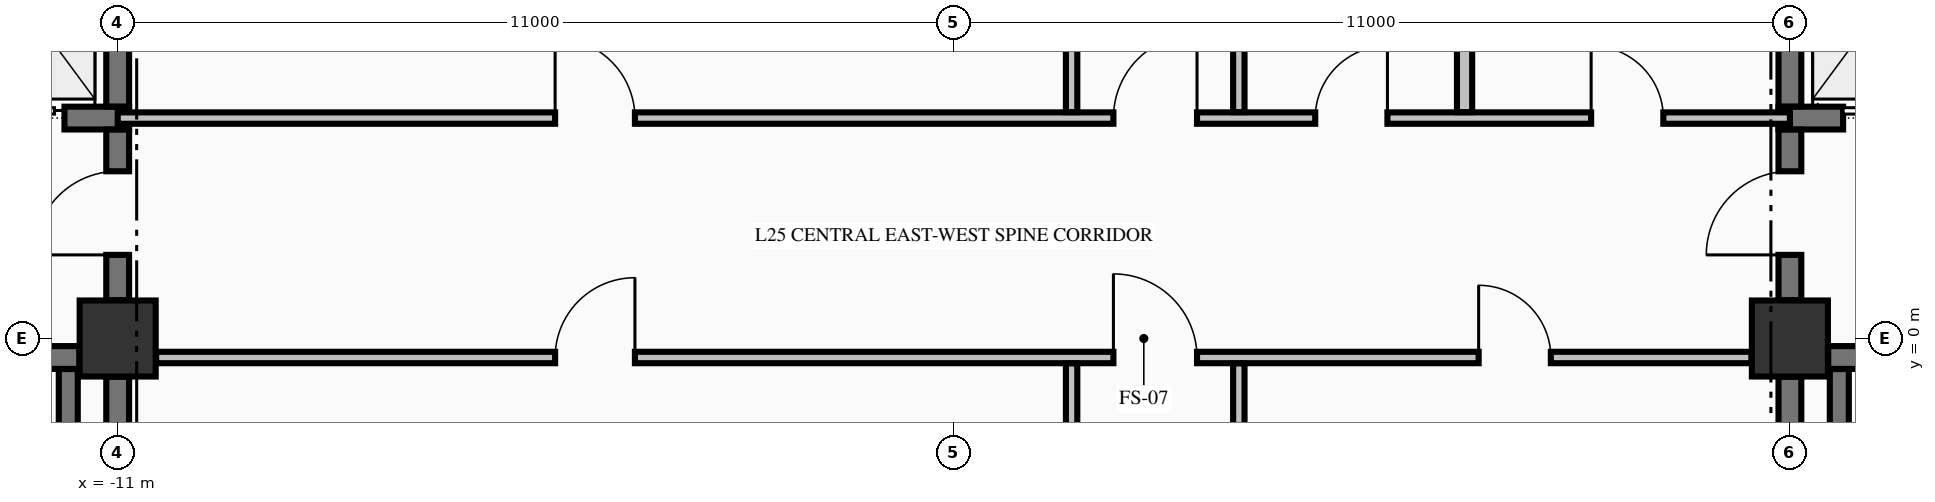
"""IFC4 building model, lengths in metres.
Left out: names, types, materials, properties, quantities, classifications, styles, units other than length and angle.
Written with IfcOpenShell. Run it as: python <this file> out.ifc"""

import sys

from ifc_helpers import new_model, si_unit, direction, frame, frame_2d, origin, origin_2d, place, context, subcontext, project, spatial, rectangle, extrude, element, fill, save


model = new_model("IFC4")
c1 = context("Model", 3, precision=1e-05, world=origin(), true_north=direction((0.0, 1.0)))
c2 = subcontext(c1, "Body", "Model", "MODEL_VIEW")
j1 = project(units=[si_unit("LENGTHUNIT", "METRE"), si_unit("PLANEANGLEUNIT", "RADIAN")], contexts=[c1])
p1 = place(None, origin())
s1 = spatial("IfcSite", under=j1, at=p1, CompositionType="ELEMENT")
p2 = place(p1, origin())
s2 = spatial("IfcBuilding", under=s1, at=p2, CompositionType="ELEMENT")
p3 = place(p2, frame((0.0, 0.0, 102.07)))
s3 = spatial("IfcBuildingStorey", under=s2, at=p3, CompositionType="ELEMENT", Elevation=102.07)
for number, where, z_axis, x_axis in (
    (1, (-11.0, 0.0, -0.25), (0.0, 0.0, 1.0), (1.0, 0.0, 0.0)),
    (2, (11.0, 0.0, -0.25), (0.0, 0.0, 1.0), (1.0, 0.0, 0.0)),
):
    element("IfcColumn", number, at=place(p3, frame(where, z_axis=z_axis, x_axis=x_axis)), inside=s3, PredefinedType="COLUMN", context=c2, shape_type="SweptSolid", body=[
        extrude(rectangle(XDim=1.0, YDim=1.0, at=origin_2d()), origin(), (0.0, 0.0, 1.0), 3.57),
    ])
p4 = place(p3, frame((-19.496, -0.25, 0.0), z_axis=(0.0, 0.0, 1.0), x_axis=(1.0, 0.0, 0.0)))
e3 = element("IfcWall", 3, at=p4, inside=s3, PredefinedType="SHEAR", context=c2, shape_type="SweptSolid", body=[
    extrude(rectangle(XDim=7.992, YDim=0.3, at=frame_2d((3.996, 0.0))), origin(), (0.0, 0.0, 1.0), 3.32),
])
p5 = place(p4, frame((5.796, 0.0, 0.0)))
e4 = element("IfcOpeningElement", 4, at=p5, cuts=e3, PredefinedType="OPENING", context=c2, shape_type="SweptSolid", body=[
    extrude(rectangle(XDim=1.1, YDim=2.15, at=frame_2d((0.55, 1.075))), frame((0.0, 0.16, 0.0), z_axis=(0.0, -1.0, 0.0), x_axis=(1.0, 0.0, 0.0)), (0.0, 0.0, 1.0), 0.32),
])
p6 = place(p3, frame((11.504, -0.25, 0.0), z_axis=(0.0, 0.0, 1.0), x_axis=(1.0, 0.0, 0.0)))
e5 = element("IfcWall", 5, at=p6, inside=s3, PredefinedType="SHEAR", context=c2, shape_type="SweptSolid", body=[
    extrude(rectangle(XDim=3.371, YDim=0.3, at=frame_2d((1.686, 0.0))), origin(), (0.0, 0.0, 1.0), 3.32),
])
p7 = place(p6, frame((1.096, 0.0, 0.0)))
e6 = element("IfcOpeningElement", 6, at=p7, cuts=e5, PredefinedType="OPENING", context=c2, shape_type="SweptSolid", body=[
    extrude(rectangle(XDim=1.1, YDim=2.15, at=frame_2d((0.55, 1.075))), frame((0.0, 0.16, 0.0), z_axis=(0.0, -1.0, 0.0), x_axis=(1.0, 0.0, 0.0)), (0.0, 0.0, 1.0), 0.32),
])
p8 = place(p3, frame((-14.875, 2.9, 0.0), z_axis=(0.0, 0.0, 1.0), x_axis=(1.0, 0.0, 0.0)))
e7 = element("IfcWall", 7, at=p8, inside=s3, PredefinedType="SHEAR", context=c2, shape_type="SweptSolid", body=[
    extrude(rectangle(XDim=4.025, YDim=0.3, at=frame_2d((2.012, 0.0))), origin(), (0.0, 0.0, 1.0), 3.32),
])
p9 = place(p8, frame((2.075, 0.0, 0.0)))
e8 = element("IfcOpeningElement", 8, at=p9, cuts=e7, PredefinedType="OPENING", context=c2, shape_type="SweptSolid", body=[
    extrude(rectangle(XDim=1.1, YDim=2.2, at=frame_2d((0.55, 1.1))), frame((0.0, 0.16, 0.0), z_axis=(0.0, -1.0, 0.0), x_axis=(1.0, 0.0, 0.0)), (0.0, 0.0, 1.0), 0.32),
])
p10 = place(p3, frame((10.85, 2.9, 0.0), z_axis=(0.0, 0.0, 1.0), x_axis=(1.0, 0.0, 0.0)))
e9 = element("IfcWall", 9, at=p10, inside=s3, PredefinedType="SHEAR", context=c2, shape_type="SweptSolid", body=[
    extrude(rectangle(XDim=4.025, YDim=0.3, at=frame_2d((2.012, 0.0))), origin(), (0.0, 0.0, 1.0), 3.32),
])
p11 = place(p10, frame((0.85, 0.0, 0.0)))
e10 = element("IfcOpeningElement", 10, at=p11, cuts=e9, PredefinedType="OPENING", context=c2, shape_type="SweptSolid", body=[
    extrude(rectangle(XDim=1.1, YDim=2.2, at=frame_2d((0.55, 1.1))), frame((0.0, 0.16, 0.0), z_axis=(0.0, -1.0, 0.0), x_axis=(1.0, 0.0, 0.0)), (0.0, 0.0, 1.0), 0.32),
])
p12 = place(p3, frame((-10.494, -0.25, 0.0), z_axis=(0.0, 0.0, 1.0), x_axis=(1.0, 0.0, 0.0)))
e11 = element("IfcWall", 11, at=p12, inside=s3, PredefinedType="PARTITIONING", context=c2, shape_type="SweptSolid", body=[
    extrude(rectangle(XDim=20.988, YDim=0.15, at=frame_2d((10.494, 0.0))), origin(), (0.0, 0.0, 1.0), 3.32),
])
p13 = place(p12, frame((12.594, 0.0, 0.0)))
e12 = element("IfcOpeningElement", 12, at=p13, cuts=e11, PredefinedType="OPENING", context=c2, shape_type="SweptSolid", body=[
    extrude(rectangle(XDim=1.1, YDim=2.15, at=frame_2d((0.55, 1.075))), frame((0.0, 0.085, 0.0), z_axis=(0.0, -1.0, 0.0), x_axis=(1.0, 0.0, 0.0)), (0.0, 0.0, 1.0), 0.17),
])
p14 = place(p12, frame((5.249, 0.0, 0.0)))
e13 = element("IfcOpeningElement", 13, at=p14, cuts=e11, PredefinedType="OPENING", context=c2, shape_type="SweptSolid", body=[
    extrude(rectangle(XDim=1.05, YDim=2.15, at=frame_2d((0.525, 1.075))), frame((0.0, 0.085, 0.0), z_axis=(0.0, -1.0, 0.0), x_axis=(1.0, 0.0, 0.0)), (0.0, 0.0, 1.0), 0.17),
])
p15 = place(p12, frame((17.399, 0.0, 0.0)))
e14 = element("IfcOpeningElement", 14, at=p15, cuts=e11, PredefinedType="OPENING", context=c2, shape_type="SweptSolid", body=[
    extrude(rectangle(XDim=0.95, YDim=2.15, at=frame_2d((0.475, 1.075))), frame((0.0, 0.085, 0.0), z_axis=(0.0, -1.0, 0.0), x_axis=(1.0, 0.0, 0.0)), (0.0, 0.0, 1.0), 0.17),
])
p16 = place(p3, frame((-11.0, 2.9, 0.0), z_axis=(0.0, 0.0, 1.0), x_axis=(1.0, 0.0, 0.0)))
e15 = element("IfcWall", 15, at=p16, inside=s3, PredefinedType="PARTITIONING", context=c2, shape_type="SweptSolid", body=[
    extrude(rectangle(XDim=22.0, YDim=0.15, at=frame_2d((11.0, 0.0))), origin(), (0.0, 0.0, 1.0), 3.32),
])
p17 = place(p16, frame((13.1, 0.0, 0.0)))
e16 = element("IfcOpeningElement", 16, at=p17, cuts=e15, PredefinedType="OPENING", context=c2, shape_type="SweptSolid", body=[
    extrude(rectangle(XDim=1.1, YDim=2.15, at=frame_2d((0.55, 1.075))), frame((0.0, 0.085, 0.0), z_axis=(0.0, -1.0, 0.0), x_axis=(1.0, 0.0, 0.0)), (0.0, 0.0, 1.0), 0.17),
])
p18 = place(p16, frame((5.755, 0.0, 0.0)))
e17 = element("IfcOpeningElement", 17, at=p18, cuts=e15, PredefinedType="OPENING", context=c2, shape_type="SweptSolid", body=[
    extrude(rectangle(XDim=1.05, YDim=2.15, at=frame_2d((0.525, 1.075))), frame((0.0, 0.085, 0.0), z_axis=(0.0, -1.0, 0.0), x_axis=(1.0, 0.0, 0.0)), (0.0, 0.0, 1.0), 0.17),
])
p19 = place(p16, frame((15.755, 0.0, 0.0)))
e18 = element("IfcOpeningElement", 18, at=p19, cuts=e15, PredefinedType="OPENING", context=c2, shape_type="SweptSolid", body=[
    extrude(rectangle(XDim=0.95, YDim=2.15, at=frame_2d((0.475, 1.075))), frame((0.0, 0.085, 0.0), z_axis=(0.0, -1.0, 0.0), x_axis=(1.0, 0.0, 0.0)), (0.0, 0.0, 1.0), 0.17),
])
p20 = place(p16, frame((19.385, 0.0, 0.0)))
e19 = element("IfcOpeningElement", 19, at=p20, cuts=e15, PredefinedType="OPENING", context=c2, shape_type="SweptSolid", body=[
    extrude(rectangle(XDim=0.95, YDim=2.15, at=frame_2d((0.475, 1.075))), frame((0.0, 0.085, 0.0), z_axis=(0.0, -1.0, 0.0), x_axis=(1.0, 0.0, 0.0)), (0.0, 0.0, 1.0), 0.17),
])
p21 = place(p3, frame((-11.65, -9.798, 0.0), z_axis=(0.0, 0.0, 1.0), x_axis=(0.0, 1.0, 0.0)))
e20 = element("IfcWall", 20, at=p21, inside=s3, PredefinedType="SOLIDWALL", context=c2, shape_type="SweptSolid", body=[
    extrude(rectangle(XDim=9.396, YDim=0.25, at=frame_2d((4.698, 0.0))), origin(), (0.0, 0.0, 1.0), 3.32),
])
p22 = place(p3, frame((-11.0, -9.446, 0.0), z_axis=(0.0, 0.0, 1.0), x_axis=(0.0, 1.0, 0.0)))
e21 = element("IfcWall", 21, at=p22, inside=s3, PredefinedType="SHEAR", context=c2, shape_type="SweptSolid", body=[
    extrude(rectangle(XDim=8.942, YDim=0.3, at=frame_2d((4.471, 0.0))), origin(), (0.0, 0.0, 1.0), 3.32),
])
p23 = place(p3, frame((-11.0, 0.504, 0.0), z_axis=(0.0, 0.0, 1.0), x_axis=(0.0, 1.0, 0.0)))
e22 = element("IfcWall", 22, at=p23, inside=s3, PredefinedType="SHEAR", context=c2, shape_type="SweptSolid", body=[
    extrude(rectangle(XDim=2.244, YDim=0.3, at=frame_2d((1.122, 0.0))), origin(), (0.0, 0.0, 1.0), 3.32),
])
p24 = place(p23, frame((0.596, 0.0, 0.0)))
e23 = element("IfcOpeningElement", 23, at=p24, cuts=e22, PredefinedType="OPENING", context=c2, shape_type="SweptSolid", body=[
    extrude(rectangle(XDim=1.1, YDim=2.15, at=frame_2d((0.55, 1.075))), frame((0.0, 0.16, 0.0), z_axis=(0.0, -1.0, 0.0), x_axis=(1.0, 0.0, 0.0)), (0.0, 0.0, 1.0), 0.32),
])
p25 = place(p3, frame((-11.0, 3.052, 0.0), z_axis=(0.0, 0.0, 1.0), x_axis=(0.0, 1.0, 0.0)))
e24 = element("IfcWall", 24, at=p25, inside=s3, PredefinedType="SHEAR", context=c2, shape_type="SweptSolid", body=[
    extrude(rectangle(XDim=2.496, YDim=0.3, at=frame_2d((1.248, 0.0))), origin(), (0.0, 0.0, 1.0), 3.32),
])
p26 = place(p3, frame((11.0, -9.446, 0.0), z_axis=(0.0, 0.0, 1.0), x_axis=(0.0, 1.0, 0.0)))
e25 = element("IfcWall", 25, at=p26, inside=s3, PredefinedType="SHEAR", context=c2, shape_type="SweptSolid", body=[
    extrude(rectangle(XDim=8.942, YDim=0.3, at=frame_2d((4.471, 0.0))), origin(), (0.0, 0.0, 1.0), 3.32),
])
p27 = place(p3, frame((11.0, 0.504, 0.0), z_axis=(0.0, 0.0, 1.0), x_axis=(0.0, 1.0, 0.0)))
e26 = element("IfcWall", 26, at=p27, inside=s3, PredefinedType="SHEAR", context=c2, shape_type="SweptSolid", body=[
    extrude(rectangle(XDim=2.244, YDim=0.3, at=frame_2d((1.122, 0.0))), origin(), (0.0, 0.0, 1.0), 3.32),
])
p28 = place(p27, frame((0.596, 0.0, 0.0)))
e27 = element("IfcOpeningElement", 27, at=p28, cuts=e26, PredefinedType="OPENING", context=c2, shape_type="SweptSolid", body=[
    extrude(rectangle(XDim=1.1, YDim=2.15, at=frame_2d((0.55, 1.075))), frame((0.0, 0.16, 0.0), z_axis=(0.0, -1.0, 0.0), x_axis=(1.0, 0.0, 0.0)), (0.0, 0.0, 1.0), 0.32),
])
p29 = place(p3, frame((11.0, 3.052, 0.0), z_axis=(0.0, 0.0, 1.0), x_axis=(0.0, 1.0, 0.0)))
e28 = element("IfcWall", 28, at=p29, inside=s3, PredefinedType="SHEAR", context=c2, shape_type="SweptSolid", body=[
    extrude(rectangle(XDim=2.496, YDim=0.3, at=frame_2d((1.248, 0.0))), origin(), (0.0, 0.0, 1.0), 3.32),
])
p30 = place(p3, frame((11.65, -9.798, 0.0), z_axis=(0.0, 0.0, 1.0), x_axis=(0.0, 1.0, 0.0)))
e29 = element("IfcWall", 29, at=p30, inside=s3, PredefinedType="SOLIDWALL", context=c2, shape_type="SweptSolid", body=[
    extrude(rectangle(XDim=9.396, YDim=0.25, at=frame_2d((4.698, 0.0))), origin(), (0.0, 0.0, 1.0), 3.32),
])
p31 = place(p3, frame((1.55, -9.872, 0.0), z_axis=(0.0, 0.0, 1.0), x_axis=(0.0, 1.0, 0.0)))
e30 = element("IfcWall", 30, at=p31, inside=s3, PredefinedType="PARTITIONING", context=c2, shape_type="SweptSolid", body=[
    extrude(rectangle(XDim=9.544, YDim=0.15, at=frame_2d((4.772, 0.0))), origin(), (0.0, 0.0, 1.0), 3.32),
])
p32 = place(p3, frame((1.55, 2.978, 0.0), z_axis=(0.0, 0.0, 1.0), x_axis=(0.0, 1.0, 0.0)))
e31 = element("IfcWall", 31, at=p32, inside=s3, PredefinedType="PARTITIONING", context=c2, shape_type="SweptSolid", body=[
    extrude(rectangle(XDim=7.444, YDim=0.15, at=frame_2d((3.722, 0.0))), origin(), (0.0, 0.0, 1.0), 3.32),
])
p33 = place(p3, frame((3.75, -4.147, 0.0), z_axis=(0.0, 0.0, 1.0), x_axis=(0.0, 1.0, 0.0)))
e32 = element("IfcWall", 32, at=p33, inside=s3, PredefinedType="PARTITIONING", context=c2, shape_type="SweptSolid", body=[
    extrude(rectangle(XDim=3.819, YDim=0.15, at=frame_2d((1.91, 0.0))), origin(), (0.0, 0.0, 1.0), 3.32),
])
p34 = place(p3, frame((3.75, 2.978, 0.0), z_axis=(0.0, 0.0, 1.0), x_axis=(0.0, 1.0, 0.0)))
e33 = element("IfcWall", 33, at=p34, inside=s3, PredefinedType="PARTITIONING", context=c2, shape_type="SweptSolid", body=[
    extrude(rectangle(XDim=7.444, YDim=0.15, at=frame_2d((3.722, 0.0))), origin(), (0.0, 0.0, 1.0), 3.32),
])
p35 = place(p3, frame((6.72, 2.978, 0.0), z_axis=(0.0, 0.0, 1.0), x_axis=(0.0, 1.0, 0.0)))
e34 = element("IfcWall", 34, at=p35, inside=s3, PredefinedType="PARTITIONING", context=c2, shape_type="SweptSolid", body=[
    extrude(rectangle(XDim=7.444, YDim=0.2, at=frame_2d((3.722, 0.0))), origin(), (0.0, 0.0, 1.0), 3.32),
])
p36 = place(p24, origin())
e35 = element("IfcDoor", 35, at=p36, inside=s3, OperationType="SINGLE_SWING_LEFT", PredefinedType="DOOR", context=c2, shape_type="SweptSolid", body=[
    extrude(rectangle(XDim=1.1, YDim=2.15, at=frame_2d((0.55, 1.075))), frame((0.0, 0.025, 0.0), z_axis=(0.0, -1.0, 0.0), x_axis=(1.0, 0.0, 0.0)), (0.0, 0.0, 1.0), 0.05),
])
fill(e23, e35)
p37 = place(p9, origin())
e36 = element("IfcDoor", 36, at=p37, inside=s3, OperationType="SLIDING_TO_LEFT", PredefinedType="DOOR", context=c2, shape_type="SweptSolid", body=[
    extrude(rectangle(XDim=1.1, YDim=2.2, at=frame_2d((0.55, 1.1))), frame((0.0, 0.025, 0.0), z_axis=(0.0, -1.0, 0.0), x_axis=(1.0, 0.0, 0.0)), (0.0, 0.0, 1.0), 0.05),
])
fill(e8, e36)
p38 = place(p28, origin())
e37 = element("IfcDoor", 37, at=p38, inside=s3, OperationType="SINGLE_SWING_LEFT", PredefinedType="DOOR", context=c2, shape_type="SweptSolid", body=[
    extrude(rectangle(XDim=1.1, YDim=2.15, at=frame_2d((0.55, 1.075))), frame((0.0, 0.025, 0.0), z_axis=(0.0, -1.0, 0.0), x_axis=(1.0, 0.0, 0.0)), (0.0, 0.0, 1.0), 0.05),
])
fill(e27, e37)
p39 = place(p11, origin())
e38 = element("IfcDoor", 38, at=p39, inside=s3, OperationType="SLIDING_TO_RIGHT", PredefinedType="DOOR", context=c2, shape_type="SweptSolid", body=[
    extrude(rectangle(XDim=1.1, YDim=2.2, at=frame_2d((0.55, 1.1))), frame((0.0, 0.025, 0.0), z_axis=(0.0, -1.0, 0.0), x_axis=(1.0, 0.0, 0.0)), (0.0, 0.0, 1.0), 0.05),
])
fill(e10, e38)
p40 = place(p17, origin())
e39 = element("IfcDoor", 39, at=p40, inside=s3, OperationType="SINGLE_SWING_RIGHT", PredefinedType="DOOR", context=c2, shape_type="SweptSolid", body=[
    extrude(rectangle(XDim=1.1, YDim=2.15, at=frame_2d((0.55, 1.075))), frame((0.0, 0.025, 0.0), z_axis=(0.0, -1.0, 0.0), x_axis=(1.0, 0.0, 0.0)), (0.0, 0.0, 1.0), 0.05),
])
fill(e16, e39)
p41 = place(p13, origin())
e40 = element("IfcDoor", 40, at=p41, inside=s3, OperationType="SINGLE_SWING_LEFT", PredefinedType="DOOR", context=c2, shape_type="SweptSolid", body=[
    extrude(rectangle(XDim=1.1, YDim=2.15, at=frame_2d((0.55, 1.075))), frame((0.0, 0.025, 0.0), z_axis=(0.0, -1.0, 0.0), x_axis=(1.0, 0.0, 0.0)), (0.0, 0.0, 1.0), 0.05),
])
fill(e12, e40)
p42 = place(p18, origin())
e41 = element("IfcDoor", 41, at=p42, inside=s3, OperationType="SINGLE_SWING_LEFT", PredefinedType="DOOR", context=c2, shape_type="SweptSolid", body=[
    extrude(rectangle(XDim=1.05, YDim=2.15, at=frame_2d((0.525, 1.075))), frame((0.0, 0.025, 0.0), z_axis=(0.0, -1.0, 0.0), x_axis=(1.0, 0.0, 0.0)), (0.0, 0.0, 1.0), 0.05),
])
fill(e17, e41)
p43 = place(p19, origin())
e42 = element("IfcDoor", 42, at=p43, inside=s3, OperationType="SINGLE_SWING_RIGHT", PredefinedType="DOOR", context=c2, shape_type="SweptSolid", body=[
    extrude(rectangle(XDim=0.95, YDim=2.15, at=frame_2d((0.475, 1.075))), frame((0.0, 0.025, 0.0), z_axis=(0.0, -1.0, 0.0), x_axis=(1.0, 0.0, 0.0)), (0.0, 0.0, 1.0), 0.05),
])
fill(e18, e42)
p44 = place(p20, origin())
e43 = element("IfcDoor", 43, at=p44, inside=s3, OperationType="SINGLE_SWING_LEFT", PredefinedType="DOOR", context=c2, shape_type="SweptSolid", body=[
    extrude(rectangle(XDim=0.95, YDim=2.15, at=frame_2d((0.475, 1.075))), frame((0.0, 0.025, 0.0), z_axis=(0.0, -1.0, 0.0), x_axis=(1.0, 0.0, 0.0)), (0.0, 0.0, 1.0), 0.05),
])
fill(e19, e43)
p45 = place(p14, origin())
e44 = element("IfcDoor", 44, at=p45, inside=s3, OperationType="SINGLE_SWING_RIGHT", PredefinedType="DOOR", context=c2, shape_type="SweptSolid", body=[
    extrude(rectangle(XDim=1.05, YDim=2.15, at=frame_2d((0.525, 1.075))), frame((0.0, 0.025, 0.0), z_axis=(0.0, -1.0, 0.0), x_axis=(1.0, 0.0, 0.0)), (0.0, 0.0, 1.0), 0.05),
])
fill(e13, e44)
p46 = place(p15, origin())
e45 = element("IfcDoor", 45, at=p46, inside=s3, OperationType="SINGLE_SWING_LEFT", PredefinedType="DOOR", context=c2, shape_type="SweptSolid", body=[
    extrude(rectangle(XDim=0.95, YDim=2.15, at=frame_2d((0.475, 1.075))), frame((0.0, 0.025, 0.0), z_axis=(0.0, -1.0, 0.0), x_axis=(1.0, 0.0, 0.0)), (0.0, 0.0, 1.0), 0.05),
])
fill(e14, e45)
save(model, sys.argv[1])
